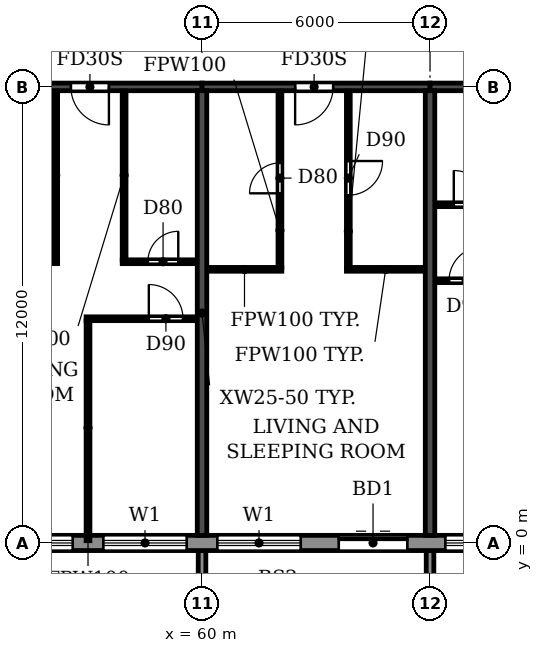
"""IFC4 building model, lengths in metres.
Left out: names, types, materials, properties, quantities, classifications, styles, units other than length and angle.
Written with IfcOpenShell. Run it as: python <this file> out.ifc"""

import sys

from ifc_helpers import new_model, si_unit, direction, frame, frame_2d, origin, place, context, subcontext, project, spatial, polyline, rectangle, outline, extrude, source, transform, mapped, element, fill, save


model = new_model("IFC4")
c1 = context("Model", 3, precision=1e-05, world=origin(), true_north=direction((0.0, 1.0)))
c2 = subcontext(c1, "Body", "Model", "MODEL_VIEW")
j1 = project(units=[si_unit("LENGTHUNIT", "METRE"), si_unit("PLANEANGLEUNIT", "RADIAN")], contexts=[c1])
p1 = place(None, origin())
s1 = spatial("IfcSite", under=j1, at=p1, CompositionType="ELEMENT")
p2 = place(p1, origin())
s2 = spatial("IfcBuilding", under=s1, at=p2, CompositionType="ELEMENT")
p3 = place(p2, frame((0.0, 0.0, 231.3)))
s3 = spatial("IfcBuildingStorey", under=s2, at=p3, CompositionType="ELEMENT", Elevation=231.3)
for number, where, z_axis, x_axis in (
    (1, (60.0, 0.2, 0.0), (0.0, 0.0, 1.0), (0.0, 1.0, 0.0)),
    (2, (66.0, 0.2, 0.0), (0.0, 0.0, 1.0), (0.0, 1.0, 0.0)),
):
    element("IfcWall", number, at=place(p3, frame(where, z_axis=z_axis, x_axis=x_axis)), inside=s3, PredefinedType="SHEAR", context=c2, shape_type="SweptSolid", body=[
        extrude(rectangle(XDim=11.7, YDim=0.25, at=frame_2d((5.85, 0.0))), origin(), (0.0, 0.0, 1.0), 3.08),
    ])
p4 = place(p3, frame((54.0, 12.0, 0.0), z_axis=(0.0, 0.0, 1.0), x_axis=(1.0, 0.0, 0.0)))
e3 = element("IfcWall", 3, at=p4, inside=s3, PredefinedType="SHEAR", context=c2, shape_type="SweptSolid", body=[
    extrude(rectangle(XDim=6.0, YDim=0.2, at=frame_2d((3.0, 0.0))), origin(), (0.0, 0.0, 1.0), 2.48),
])
p5 = place(p4, frame((2.55, 0.0, 0.0)))
e4 = element("IfcOpeningElement", 4, at=p5, cuts=e3, PredefinedType="OPENING", context=c2, shape_type="SweptSolid", body=[
    extrude(rectangle(XDim=1.0, YDim=2.1, at=frame_2d((0.5, 1.05))), frame((0.0, 0.11, 0.0), z_axis=(0.0, -1.0, 0.0), x_axis=(1.0, 0.0, 0.0)), (0.0, 0.0, 1.0), 0.22),
])
p6 = place(p3, frame((60.0, 12.0, 0.0), z_axis=(0.0, 0.0, 1.0), x_axis=(1.0, 0.0, 0.0)))
e5 = element("IfcWall", 5, at=p6, inside=s3, PredefinedType="SHEAR", context=c2, shape_type="SweptSolid", body=[
    extrude(rectangle(XDim=6.0, YDim=0.2, at=frame_2d((3.0, 0.0))), origin(), (0.0, 0.0, 1.0), 2.48),
])
p7 = place(p6, frame((2.45, 0.0, 0.0)))
e6 = element("IfcOpeningElement", 6, at=p7, cuts=e5, PredefinedType="OPENING", context=c2, shape_type="SweptSolid", body=[
    extrude(rectangle(XDim=1.0, YDim=2.1, at=frame_2d((0.5, 1.05))), frame((0.0, 0.11, 0.0), z_axis=(0.0, -1.0, 0.0), x_axis=(1.0, 0.0, 0.0)), (0.0, 0.0, 1.0), 0.22),
])
p8 = place(p3, frame((66.0, 12.0, 0.0), z_axis=(0.0, 0.0, 1.0), x_axis=(1.0, 0.0, 0.0)))
e7 = element("IfcWall", 7, at=p8, inside=s3, PredefinedType="SHEAR", context=c2, shape_type="SweptSolid", body=[
    extrude(rectangle(XDim=6.0, YDim=0.2, at=frame_2d((3.0, 0.0))), origin(), (0.0, 0.0, 1.0), 2.48),
])
p9 = place(p8, frame((2.55, 0.0, 0.0)))
e8 = element("IfcOpeningElement", 8, at=p9, cuts=e7, PredefinedType="OPENING", context=c2, shape_type="SweptSolid", body=[
    extrude(rectangle(XDim=1.0, YDim=2.1, at=frame_2d((0.5, 1.05))), frame((0.0, 0.11, 0.0), z_axis=(0.0, -1.0, 0.0), x_axis=(1.0, 0.0, 0.0)), (0.0, 0.0, 1.0), 0.22),
])
p10 = place(p3, frame((22.683, 0.0, 0.0), z_axis=(0.0, 0.0, 1.0), x_axis=(1.0, 0.0, 0.0)))
e9 = element("IfcWall", 9, at=p10, inside=s3, PredefinedType="STANDARD", context=c2, shape_type="SweptSolid", body=[
    extrude(rectangle(XDim=56.634, YDim=0.4, at=frame_2d((28.317, 0.0))), origin(), (0.0, 0.0, 1.0), 3.08),
])
p11 = place(p10, frame((1.917, 0.0, 0.0)))
e10 = element("IfcOpeningElement", 10, at=p11, cuts=e9, PredefinedType="OPENING", context=c2, shape_type="SweptSolid", body=[
    extrude(rectangle(XDim=1.8, YDim=2.4, at=frame_2d((0.9, 1.2))), frame((0.0, 0.21, 0.0), z_axis=(0.0, -1.0, 0.0), x_axis=(1.0, 0.0, 0.0)), (0.0, 0.0, 1.0), 0.42),
])
p12 = place(p10, frame((4.717, 0.0, 0.9)))
e11 = element("IfcOpeningElement", 11, at=p12, cuts=e9, PredefinedType="OPENING", context=c2, shape_type="SweptSolid", body=[
    extrude(rectangle(XDim=2.2, YDim=1.5, at=frame_2d((1.1, 0.75))), frame((0.0, 0.21, 0.0), z_axis=(0.0, -1.0, 0.0), x_axis=(1.0, 0.0, 0.0)), (0.0, 0.0, 1.0), 0.42),
])
p13 = place(p10, frame((7.717, 0.0, 0.9)))
e12 = element("IfcOpeningElement", 12, at=p13, cuts=e9, PredefinedType="OPENING", context=c2, shape_type="SweptSolid", body=[
    extrude(rectangle(XDim=2.2, YDim=1.5, at=frame_2d((1.1, 0.75))), frame((0.0, 0.21, 0.0), z_axis=(0.0, -1.0, 0.0), x_axis=(1.0, 0.0, 0.0)), (0.0, 0.0, 1.0), 0.42),
])
p14 = place(p10, frame((10.717, 0.0, 0.9)))
e13 = element("IfcOpeningElement", 13, at=p14, cuts=e9, PredefinedType="OPENING", context=c2, shape_type="SweptSolid", body=[
    extrude(rectangle(XDim=2.2, YDim=1.5, at=frame_2d((1.1, 0.75))), frame((0.0, 0.21, 0.0), z_axis=(0.0, -1.0, 0.0), x_axis=(1.0, 0.0, 0.0)), (0.0, 0.0, 1.0), 0.42),
])
p15 = place(p10, frame((13.717, 0.0, 0.9)))
e14 = element("IfcOpeningElement", 14, at=p15, cuts=e9, PredefinedType="OPENING", context=c2, shape_type="SweptSolid", body=[
    extrude(rectangle(XDim=2.2, YDim=1.5, at=frame_2d((1.1, 0.75))), frame((0.0, 0.21, 0.0), z_axis=(0.0, -1.0, 0.0), x_axis=(1.0, 0.0, 0.0)), (0.0, 0.0, 1.0), 0.42),
])
p16 = place(p10, frame((16.917, 0.0, 0.0)))
e15 = element("IfcOpeningElement", 15, at=p16, cuts=e9, PredefinedType="OPENING", context=c2, shape_type="SweptSolid", body=[
    extrude(rectangle(XDim=1.8, YDim=2.4, at=frame_2d((0.9, 1.2))), frame((0.0, 0.21, 0.0), z_axis=(0.0, -1.0, 0.0), x_axis=(1.0, 0.0, 0.0)), (0.0, 0.0, 1.0), 0.42),
])
p17 = place(p10, frame((19.717, 0.0, 0.9)))
e16 = element("IfcOpeningElement", 16, at=p17, cuts=e9, PredefinedType="OPENING", context=c2, shape_type="SweptSolid", body=[
    extrude(rectangle(XDim=2.2, YDim=1.5, at=frame_2d((1.1, 0.75))), frame((0.0, 0.21, 0.0), z_axis=(0.0, -1.0, 0.0), x_axis=(1.0, 0.0, 0.0)), (0.0, 0.0, 1.0), 0.42),
])
p18 = place(p10, frame((22.717, 0.0, 0.9)))
e17 = element("IfcOpeningElement", 17, at=p18, cuts=e9, PredefinedType="OPENING", context=c2, shape_type="SweptSolid", body=[
    extrude(rectangle(XDim=2.2, YDim=1.5, at=frame_2d((1.1, 0.75))), frame((0.0, 0.21, 0.0), z_axis=(0.0, -1.0, 0.0), x_axis=(1.0, 0.0, 0.0)), (0.0, 0.0, 1.0), 0.42),
])
p19 = place(p10, frame((25.917, 0.0, 0.0)))
e18 = element("IfcOpeningElement", 18, at=p19, cuts=e9, PredefinedType="OPENING", context=c2, shape_type="SweptSolid", body=[
    extrude(rectangle(XDim=1.8, YDim=2.4, at=frame_2d((0.9, 1.2))), frame((0.0, 0.21, 0.0), z_axis=(0.0, -1.0, 0.0), x_axis=(1.0, 0.0, 0.0)), (0.0, 0.0, 1.0), 0.42),
])
p20 = place(p10, frame((28.717, 0.0, 0.9)))
e19 = element("IfcOpeningElement", 19, at=p20, cuts=e9, PredefinedType="OPENING", context=c2, shape_type="SweptSolid", body=[
    extrude(rectangle(XDim=2.2, YDim=1.5, at=frame_2d((1.1, 0.75))), frame((0.0, 0.21, 0.0), z_axis=(0.0, -1.0, 0.0), x_axis=(1.0, 0.0, 0.0)), (0.0, 0.0, 1.0), 0.42),
])
p21 = place(p10, frame((31.717, 0.0, 0.9)))
e20 = element("IfcOpeningElement", 20, at=p21, cuts=e9, PredefinedType="OPENING", context=c2, shape_type="SweptSolid", body=[
    extrude(rectangle(XDim=2.2, YDim=1.5, at=frame_2d((1.1, 0.75))), frame((0.0, 0.21, 0.0), z_axis=(0.0, -1.0, 0.0), x_axis=(1.0, 0.0, 0.0)), (0.0, 0.0, 1.0), 0.42),
])
p22 = place(p10, frame((34.717, 0.0, 0.9)))
e21 = element("IfcOpeningElement", 21, at=p22, cuts=e9, PredefinedType="OPENING", context=c2, shape_type="SweptSolid", body=[
    extrude(rectangle(XDim=2.2, YDim=1.5, at=frame_2d((1.1, 0.75))), frame((0.0, 0.21, 0.0), z_axis=(0.0, -1.0, 0.0), x_axis=(1.0, 0.0, 0.0)), (0.0, 0.0, 1.0), 0.42),
])
p23 = place(p10, frame((37.717, 0.0, 0.9)))
e22 = element("IfcOpeningElement", 22, at=p23, cuts=e9, PredefinedType="OPENING", context=c2, shape_type="SweptSolid", body=[
    extrude(rectangle(XDim=2.2, YDim=1.5, at=frame_2d((1.1, 0.75))), frame((0.0, 0.21, 0.0), z_axis=(0.0, -1.0, 0.0), x_axis=(1.0, 0.0, 0.0)), (0.0, 0.0, 1.0), 0.42),
])
p24 = place(p10, frame((40.917, 0.0, 0.0)))
e23 = element("IfcOpeningElement", 23, at=p24, cuts=e9, PredefinedType="OPENING", context=c2, shape_type="SweptSolid", body=[
    extrude(rectangle(XDim=1.8, YDim=2.4, at=frame_2d((0.9, 1.2))), frame((0.0, 0.21, 0.0), z_axis=(0.0, -1.0, 0.0), x_axis=(1.0, 0.0, 0.0)), (0.0, 0.0, 1.0), 0.42),
])
p25 = place(p10, frame((43.717, 0.0, 0.9)))
e24 = element("IfcOpeningElement", 24, at=p25, cuts=e9, PredefinedType="OPENING", context=c2, shape_type="SweptSolid", body=[
    extrude(rectangle(XDim=2.2, YDim=1.5, at=frame_2d((1.1, 0.75))), frame((0.0, 0.21, 0.0), z_axis=(0.0, -1.0, 0.0), x_axis=(1.0, 0.0, 0.0)), (0.0, 0.0, 1.0), 0.42),
])
p26 = place(p10, frame((46.717, 0.0, 0.9)))
e25 = element("IfcOpeningElement", 25, at=p26, cuts=e9, PredefinedType="OPENING", context=c2, shape_type="SweptSolid", body=[
    extrude(rectangle(XDim=2.2, YDim=1.5, at=frame_2d((1.1, 0.75))), frame((0.0, 0.21, 0.0), z_axis=(0.0, -1.0, 0.0), x_axis=(1.0, 0.0, 0.0)), (0.0, 0.0, 1.0), 0.42),
])
p27 = place(p10, frame((49.717, 0.0, 0.9)))
e26 = element("IfcOpeningElement", 26, at=p27, cuts=e9, PredefinedType="OPENING", context=c2, shape_type="SweptSolid", body=[
    extrude(rectangle(XDim=2.2, YDim=1.5, at=frame_2d((1.1, 0.75))), frame((0.0, 0.21, 0.0), z_axis=(0.0, -1.0, 0.0), x_axis=(1.0, 0.0, 0.0)), (0.0, 0.0, 1.0), 0.42),
])
p28 = place(p10, frame((52.717, 0.0, 0.9)))
e27 = element("IfcOpeningElement", 27, at=p28, cuts=e9, PredefinedType="OPENING", context=c2, shape_type="SweptSolid", body=[
    extrude(rectangle(XDim=2.2, YDim=1.5, at=frame_2d((1.1, 0.75))), frame((0.0, 0.21, 0.0), z_axis=(0.0, -1.0, 0.0), x_axis=(1.0, 0.0, 0.0)), (0.0, 0.0, 1.0), 0.42),
])
m1 = source(origin(), c2, "Body", "SweptSolid", [
    extrude(outline(polyline([(0.0, 0.0), (0.2, 0.0), (0.2, 1.65), (0.0, 1.65), (0.0, 0.0)])), origin(), (0.0, 0.0, 1.0), 3.1),
])
for number, where in (
    (28, (59.9, -1.85, 0.0)),
    (29, (65.9, -1.85, 0.0)),
):
    element("IfcWall", number, at=place(p3, frame(where)), inside=s3, PredefinedType="STANDARD", context=c2, shape_type="MappedRepresentation", body=[
        mapped(m1, transform((0.0, 0.0, 0.0))),
    ])
p29 = place(p3, frame((56.95, 5.9, 0.0), z_axis=(0.0, 0.0, 1.0), x_axis=(1.0, 0.0, 0.0)))
e30 = element("IfcWall", 30, at=p29, inside=s3, PredefinedType="PARTITIONING", context=c2, shape_type="SweptSolid", body=[
    extrude(rectangle(XDim=2.915, YDim=0.1, at=frame_2d((1.458, 0.0))), origin(), (0.0, 0.0, 1.0), 3.08),
])
p30 = place(p29, frame((1.65, 0.0, 0.0)))
e31 = element("IfcOpeningElement", 31, at=p30, cuts=e30, PredefinedType="OPENING", context=c2, shape_type="SweptSolid", body=[
    extrude(rectangle(XDim=0.9, YDim=2.1, at=frame_2d((0.45, 1.05))), frame((0.0, 0.06, 0.0), z_axis=(0.0, -1.0, 0.0), x_axis=(1.0, 0.0, 0.0)), (0.0, 0.0, 1.0), 0.12),
])
p31 = place(p3, frame((66.135, 6.9, 0.0), z_axis=(0.0, 0.0, 1.0), x_axis=(1.0, 0.0, 0.0)))
e32 = element("IfcWall", 32, at=p31, inside=s3, PredefinedType="PARTITIONING", context=c2, shape_type="SweptSolid", body=[
    extrude(rectangle(XDim=2.915, YDim=0.1, at=frame_2d((1.458, 0.0))), origin(), (0.0, 0.0, 1.0), 3.08),
])
p32 = place(p31, frame((0.365, 0.0, 0.0)))
e33 = element("IfcOpeningElement", 33, at=p32, cuts=e32, PredefinedType="OPENING", context=c2, shape_type="SweptSolid", body=[
    extrude(rectangle(XDim=0.9, YDim=2.1, at=frame_2d((0.45, 1.05))), frame((0.0, 0.06, 0.0), z_axis=(0.0, -1.0, 0.0), x_axis=(1.0, 0.0, 0.0)), (0.0, 0.0, 1.0), 0.12),
])
p33 = place(p3, frame((60.135, 7.2, 0.0), z_axis=(0.0, 0.0, 1.0), x_axis=(1.0, 0.0, 0.0)))
e34 = element("IfcWall", 34, at=p33, inside=s3, PredefinedType="PARTITIONING", context=c2, shape_type="SweptSolid", body=[
    extrude(rectangle(XDim=1.965, YDim=0.1, at=frame_2d((0.982, 0.0))), origin(), (0.0, 0.0, 1.0), 3.08),
])
p34 = place(p3, frame((63.8, 7.2, 0.0), z_axis=(0.0, 0.0, 1.0), x_axis=(1.0, 0.0, 0.0)))
e35 = element("IfcWall", 35, at=p34, inside=s3, PredefinedType="PARTITIONING", context=c2, shape_type="SweptSolid", body=[
    extrude(rectangle(XDim=2.065, YDim=0.1, at=frame_2d((1.032, 0.0))), origin(), (0.0, 0.0, 1.0), 3.08),
])
p35 = place(p3, frame((54.135, 7.4, 0.0), z_axis=(0.0, 0.0, 1.0), x_axis=(1.0, 0.0, 0.0)))
e36 = element("IfcWall", 36, at=p35, inside=s3, PredefinedType="PARTITIONING", context=c2, shape_type="SweptSolid", body=[
    extrude(rectangle(XDim=2.065, YDim=0.1, at=frame_2d((1.032, 0.0))), origin(), (0.0, 0.0, 1.0), 3.08),
])
p36 = place(p35, frame((0.49, 0.0, 0.0)))
e37 = element("IfcOpeningElement", 37, at=p36, cuts=e36, PredefinedType="OPENING", context=c2, shape_type="SweptSolid", body=[
    extrude(rectangle(XDim=0.9, YDim=2.1, at=frame_2d((0.45, 1.05))), frame((0.0, 0.06, 0.0), z_axis=(0.0, -1.0, 0.0), x_axis=(1.0, 0.0, 0.0)), (0.0, 0.0, 1.0), 0.12),
])
p37 = place(p3, frame((57.9, 7.4, 0.0), z_axis=(0.0, 0.0, 1.0), x_axis=(1.0, 0.0, 0.0)))
e38 = element("IfcWall", 38, at=p37, inside=s3, PredefinedType="PARTITIONING", context=c2, shape_type="SweptSolid", body=[
    extrude(rectangle(XDim=1.965, YDim=0.1, at=frame_2d((0.982, 0.0))), origin(), (0.0, 0.0, 1.0), 3.08),
])
p38 = place(p37, frame((0.675, 0.0, 0.0)))
e39 = element("IfcOpeningElement", 39, at=p38, cuts=e38, PredefinedType="OPENING", context=c2, shape_type="SweptSolid", body=[
    extrude(rectangle(XDim=0.8, YDim=2.1, at=frame_2d((0.4, 1.05))), frame((0.0, 0.06, 0.0), z_axis=(0.0, -1.0, 0.0), x_axis=(1.0, 0.0, 0.0)), (0.0, 0.0, 1.0), 0.12),
])
p39 = place(p3, frame((66.135, 8.9, 0.0), z_axis=(0.0, 0.0, 1.0), x_axis=(1.0, 0.0, 0.0)))
e40 = element("IfcWall", 40, at=p39, inside=s3, PredefinedType="PARTITIONING", context=c2, shape_type="SweptSolid", body=[
    extrude(rectangle(XDim=2.065, YDim=0.1, at=frame_2d((1.032, 0.0))), origin(), (0.0, 0.0, 1.0), 3.08),
])
p40 = place(p39, frame((0.49, 0.0, 0.0)))
e41 = element("IfcOpeningElement", 41, at=p40, cuts=e40, PredefinedType="OPENING", context=c2, shape_type="SweptSolid", body=[
    extrude(rectangle(XDim=0.9, YDim=2.1, at=frame_2d((0.45, 1.05))), frame((0.0, 0.06, 0.0), z_axis=(0.0, -1.0, 0.0), x_axis=(1.0, 0.0, 0.0)), (0.0, 0.0, 1.0), 0.12),
])
p41 = place(p3, frame((56.15, 7.45, 0.0), z_axis=(0.0, 0.0, 1.0), x_axis=(0.0, 1.0, 0.0)))
e42 = element("IfcWall", 42, at=p41, inside=s3, PredefinedType="PARTITIONING", context=c2, shape_type="SweptSolid", body=[
    extrude(rectangle(XDim=4.44, YDim=0.1, at=frame_2d((2.22, 0.0))), origin(), (0.0, 0.0, 1.0), 3.08),
])
p42 = place(p3, frame((57.0, 0.06, 0.0), z_axis=(0.0, 0.0, 1.0), x_axis=(0.0, 1.0, 0.0)))
e43 = element("IfcWall", 43, at=p42, inside=s3, PredefinedType="PARTITIONING", context=c2, shape_type="SweptSolid", body=[
    extrude(rectangle(XDim=5.79, YDim=0.1, at=frame_2d((2.895, 0.0))), origin(), (0.0, 0.0, 1.0), 3.08),
])
p43 = place(p3, frame((57.95, 7.45, 0.0), z_axis=(0.0, 0.0, 1.0), x_axis=(0.0, 1.0, 0.0)))
e44 = element("IfcWall", 44, at=p43, inside=s3, PredefinedType="PARTITIONING", context=c2, shape_type="SweptSolid", body=[
    extrude(rectangle(XDim=4.44, YDim=0.1, at=frame_2d((2.22, 0.0))), origin(), (0.0, 0.0, 1.0), 3.08),
])
p44 = place(p3, frame((62.05, 7.25, 0.0), z_axis=(0.0, 0.0, 1.0), x_axis=(0.0, 1.0, 0.0)))
e45 = element("IfcWall", 45, at=p44, inside=s3, PredefinedType="PARTITIONING", context=c2, shape_type="SweptSolid", body=[
    extrude(rectangle(XDim=4.64, YDim=0.1, at=frame_2d((2.32, 0.0))), origin(), (0.0, 0.0, 1.0), 3.08),
])
p45 = place(p44, frame((1.95, 0.0, 0.0)))
e46 = element("IfcOpeningElement", 46, at=p45, cuts=e45, PredefinedType="OPENING", context=c2, shape_type="SweptSolid", body=[
    extrude(rectangle(XDim=0.8, YDim=2.1, at=frame_2d((0.4, 1.05))), frame((0.0, 0.06, 0.0), z_axis=(0.0, -1.0, 0.0), x_axis=(1.0, 0.0, 0.0)), (0.0, 0.0, 1.0), 0.12),
])
p46 = place(p3, frame((63.85, 7.25, 0.0), z_axis=(0.0, 0.0, 1.0), x_axis=(0.0, 1.0, 0.0)))
e47 = element("IfcWall", 47, at=p46, inside=s3, PredefinedType="PARTITIONING", context=c2, shape_type="SweptSolid", body=[
    extrude(rectangle(XDim=4.64, YDim=0.1, at=frame_2d((2.32, 0.0))), origin(), (0.0, 0.0, 1.0), 3.08),
])
p47 = place(p46, frame((1.9, 0.0, 0.0)))
e48 = element("IfcOpeningElement", 48, at=p47, cuts=e47, PredefinedType="OPENING", context=c2, shape_type="SweptSolid", body=[
    extrude(rectangle(XDim=0.9, YDim=2.1, at=frame_2d((0.45, 1.05))), frame((0.0, 0.06, 0.0), z_axis=(0.0, -1.0, 0.0), x_axis=(1.0, 0.0, 0.0)), (0.0, 0.0, 1.0), 0.12),
])
p48 = place(p21, origin())
e49 = element("IfcWindow", 49, at=p48, inside=s3, PartitioningType="DOUBLE_PANEL_HORIZONTAL", PredefinedType="WINDOW", context=c2, shape_type="SweptSolid", body=[
    extrude(rectangle(XDim=2.2, YDim=1.5, at=frame_2d((1.1, 0.75))), frame((0.0, 0.03, 0.0), z_axis=(0.0, -1.0, 0.0), x_axis=(1.0, 0.0, 0.0)), (0.0, 0.0, 1.0), 0.06),
])
fill(e20, e49)
p49 = place(p22, origin())
e50 = element("IfcWindow", 50, at=p49, inside=s3, PartitioningType="DOUBLE_PANEL_HORIZONTAL", PredefinedType="WINDOW", context=c2, shape_type="SweptSolid", body=[
    extrude(rectangle(XDim=2.2, YDim=1.5, at=frame_2d((1.1, 0.75))), frame((0.0, 0.03, 0.0), z_axis=(0.0, -1.0, 0.0), x_axis=(1.0, 0.0, 0.0)), (0.0, 0.0, 1.0), 0.06),
])
fill(e21, e50)
p50 = place(p23, origin())
e51 = element("IfcWindow", 51, at=p50, inside=s3, PartitioningType="DOUBLE_PANEL_HORIZONTAL", PredefinedType="WINDOW", context=c2, shape_type="SweptSolid", body=[
    extrude(rectangle(XDim=2.2, YDim=1.5, at=frame_2d((1.1, 0.75))), frame((0.0, 0.03, 0.0), z_axis=(0.0, -1.0, 0.0), x_axis=(1.0, 0.0, 0.0)), (0.0, 0.0, 1.0), 0.06),
])
fill(e22, e51)
p51 = place(p24, origin())
e52 = element("IfcDoor", 52, at=p51, inside=s3, OperationType="DOUBLE_DOOR_SLIDING", PredefinedType="DOOR", context=c2, shape_type="SweptSolid", body=[
    extrude(rectangle(XDim=1.8, YDim=2.4, at=frame_2d((0.9, 1.2))), frame((0.0, 0.025, 0.0), z_axis=(0.0, -1.0, 0.0), x_axis=(1.0, 0.0, 0.0)), (0.0, 0.0, 1.0), 0.05),
])
fill(e23, e52)
p52 = place(p25, origin())
e53 = element("IfcWindow", 53, at=p52, inside=s3, PartitioningType="DOUBLE_PANEL_HORIZONTAL", PredefinedType="WINDOW", context=c2, shape_type="SweptSolid", body=[
    extrude(rectangle(XDim=2.2, YDim=1.5, at=frame_2d((1.1, 0.75))), frame((0.0, 0.03, 0.0), z_axis=(0.0, -1.0, 0.0), x_axis=(1.0, 0.0, 0.0)), (0.0, 0.0, 1.0), 0.06),
])
fill(e24, e53)
p53 = place(p5, frame((1.0, 0.0, 0.0), z_axis=(0.0, 0.0, 1.0), x_axis=(-1.0, 0.0, 0.0)))
e54 = element("IfcDoor", 54, at=p53, inside=s3, OperationType="SINGLE_SWING_LEFT", PredefinedType="DOOR", context=c2, shape_type="SweptSolid", body=[
    extrude(rectangle(XDim=1.0, YDim=2.1, at=frame_2d((0.5, 1.05))), frame((0.0, 0.025, 0.0), z_axis=(0.0, -1.0, 0.0), x_axis=(1.0, 0.0, 0.0)), (0.0, 0.0, 1.0), 0.05),
])
fill(e4, e54)
p54 = place(p38, origin())
e55 = element("IfcDoor", 55, at=p54, inside=s3, OperationType="SINGLE_SWING_RIGHT", PredefinedType="DOOR", context=c2, shape_type="SweptSolid", body=[
    extrude(rectangle(XDim=0.8, YDim=2.1, at=frame_2d((0.4, 1.05))), frame((0.0, 0.025, 0.0), z_axis=(0.0, -1.0, 0.0), x_axis=(1.0, 0.0, 0.0)), (0.0, 0.0, 1.0), 0.05),
])
fill(e39, e55)
p55 = place(p30, origin())
e56 = element("IfcDoor", 56, at=p55, inside=s3, OperationType="SINGLE_SWING_LEFT", PredefinedType="DOOR", context=c2, shape_type="SweptSolid", body=[
    extrude(rectangle(XDim=0.9, YDim=2.1, at=frame_2d((0.45, 1.05))), frame((0.0, 0.025, 0.0), z_axis=(0.0, -1.0, 0.0), x_axis=(1.0, 0.0, 0.0)), (0.0, 0.0, 1.0), 0.05),
])
fill(e31, e56)
p56 = place(p45, origin())
e57 = element("IfcDoor", 57, at=p56, inside=s3, OperationType="SINGLE_SWING_LEFT", PredefinedType="DOOR", context=c2, shape_type="SweptSolid", body=[
    extrude(rectangle(XDim=0.8, YDim=2.1, at=frame_2d((0.4, 1.05))), frame((0.0, 0.025, 0.0), z_axis=(0.0, -1.0, 0.0), x_axis=(1.0, 0.0, 0.0)), (0.0, 0.0, 1.0), 0.05),
])
fill(e46, e57)
p57 = place(p7, frame((1.0, 0.0, 0.0), z_axis=(0.0, 0.0, 1.0), x_axis=(-1.0, 0.0, 0.0)))
e58 = element("IfcDoor", 58, at=p57, inside=s3, OperationType="SINGLE_SWING_RIGHT", PredefinedType="DOOR", context=c2, shape_type="SweptSolid", body=[
    extrude(rectangle(XDim=1.0, YDim=2.1, at=frame_2d((0.5, 1.05))), frame((0.0, 0.025, 0.0), z_axis=(0.0, -1.0, 0.0), x_axis=(1.0, 0.0, 0.0)), (0.0, 0.0, 1.0), 0.05),
])
fill(e6, e58)
p58 = place(p47, frame((0.9, 0.0, 0.0), z_axis=(0.0, 0.0, 1.0), x_axis=(-1.0, 0.0, 0.0)))
e59 = element("IfcDoor", 59, at=p58, inside=s3, OperationType="SINGLE_SWING_LEFT", PredefinedType="DOOR", context=c2, shape_type="SweptSolid", body=[
    extrude(rectangle(XDim=0.9, YDim=2.1, at=frame_2d((0.45, 1.05))), frame((0.0, 0.025, 0.0), z_axis=(0.0, -1.0, 0.0), x_axis=(1.0, 0.0, 0.0)), (0.0, 0.0, 1.0), 0.05),
])
fill(e48, e59)
p59 = place(p32, origin())
e60 = element("IfcDoor", 60, at=p59, inside=s3, OperationType="SINGLE_SWING_RIGHT", PredefinedType="DOOR", context=c2, shape_type="SweptSolid", body=[
    extrude(rectangle(XDim=0.9, YDim=2.1, at=frame_2d((0.45, 1.05))), frame((0.0, 0.025, 0.0), z_axis=(0.0, -1.0, 0.0), x_axis=(1.0, 0.0, 0.0)), (0.0, 0.0, 1.0), 0.05),
])
fill(e33, e60)
p60 = place(p40, origin())
e61 = element("IfcDoor", 61, at=p60, inside=s3, OperationType="SINGLE_SWING_LEFT", PredefinedType="DOOR", context=c2, shape_type="SweptSolid", body=[
    extrude(rectangle(XDim=0.9, YDim=2.1, at=frame_2d((0.45, 1.05))), frame((0.0, 0.025, 0.0), z_axis=(0.0, -1.0, 0.0), x_axis=(1.0, 0.0, 0.0)), (0.0, 0.0, 1.0), 0.05),
])
fill(e41, e61)
save(model, sys.argv[1])
